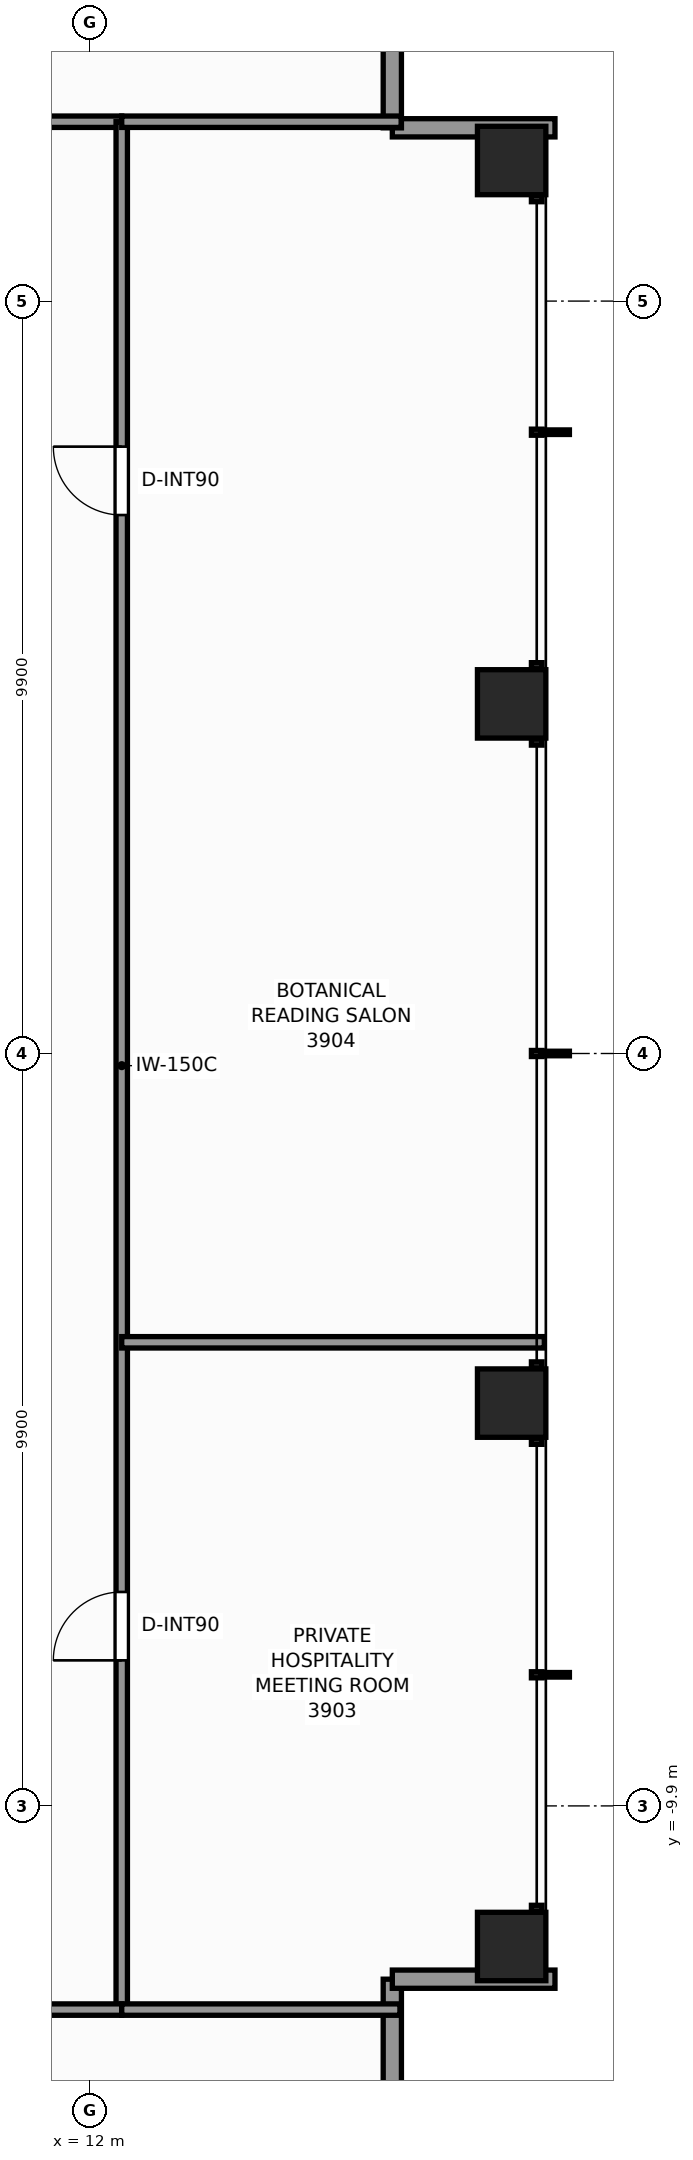
"""IFC4 building model, lengths in metres.
Left out: names, types, materials, properties, quantities, classifications, styles, units other than length and angle.
Written with IfcOpenShell. Run it as: python <this file> out.ifc"""

import sys

from ifc_helpers import new_model, si_unit, direction, frame, frame_2d, origin, origin_2d, place, context, subcontext, project, spatial, rectangle, extrude, element, fill, save


model = new_model("IFC4")
c1 = context("Model", 3, precision=1e-05, world=origin(), true_north=direction((0.0, 1.0)))
c2 = subcontext(c1, "Body", "Model", "MODEL_VIEW")
j1 = project(units=[si_unit("LENGTHUNIT", "METRE"), si_unit("PLANEANGLEUNIT", "RADIAN")], contexts=[c1])
p1 = place(None, origin())
s1 = spatial("IfcSite", under=j1, at=p1, CompositionType="ELEMENT")
p2 = place(p1, origin())
s2 = spatial("IfcBuilding", under=s1, at=p2, CompositionType="ELEMENT")
p3 = place(p2, frame((0.0, 0.0, 134.9)))
s3 = spatial("IfcBuildingStorey", under=s2, at=p3, CompositionType="ELEMENT", Elevation=134.9)
for number, where, z_axis, x_axis in (
    (1, (17.55, -11.75, 0.0), (0.0, 0.0, 1.0), (1.0, 0.0, 0.0)),
    (2, (17.55, -4.6, 0.0), (0.0, 0.0, 1.0), (1.0, 0.0, 0.0)),
    (3, (17.55, 4.6, 0.0), (0.0, 0.0, 1.0), (1.0, 0.0, 0.0)),
    (4, (17.55, 11.75, 0.0), (0.0, 0.0, 1.0), (1.0, 0.0, 0.0)),
):
    element("IfcColumn", number, at=place(p3, frame(where, z_axis=z_axis, x_axis=x_axis)), inside=s3, PredefinedType="COLUMN", context=c2, shape_type="SweptSolid", body=[
        extrude(rectangle(XDim=0.9, YDim=0.9, at=origin_2d()), origin(), (0.0, 0.0, 1.0), 3.3),
    ])
for number, where, z_axis, x_axis in (
    (5, (15.98, -12.18, 0.0), (0.0, 0.0, 1.0), (0.0, -1.0, 0.0)),
    (6, (18.12, -12.18, 0.0), (0.0, 0.0, 1.0), (-1.0, 0.0, 0.0)),
    (7, (15.98, 12.18, 0.0), (0.0, 0.0, 1.0), (1.0, 0.0, 0.0)),
    (8, (15.98, 14.32, 0.0), (0.0, 0.0, 1.0), (0.0, -1.0, 0.0)),
):
    element("IfcWall", number, at=place(p3, frame(where, z_axis=z_axis, x_axis=x_axis)), inside=s3, PredefinedType="STANDARD", context=c2, shape_type="SweptSolid", body=[
        extrude(rectangle(XDim=2.14, YDim=0.24, at=frame_2d((1.07, 0.0))), origin(), (0.0, 0.0, 1.0), 2.479),
    ])
p4 = place(p3, frame((-12.26, 12.26, 0.0), z_axis=(0.0, 0.0, 1.0), x_axis=(1.0, 0.0, 0.0)))
e9 = element("IfcWall", 9, at=p4, inside=s3, PredefinedType="PARTITIONING", context=c2, shape_type="SweptSolid", body=[
    extrude(rectangle(XDim=24.68, YDim=0.15, at=frame_2d((12.34, 0.0))), origin(), (0.0, 0.0, 1.0), 2.312),
])
p5 = place(p4, frame((4.275, 0.0, 0.0)))
e10 = element("IfcOpeningElement", 10, at=p5, cuts=e9, PredefinedType="OPENING", context=c2, shape_type="SweptSolid", body=[
    extrude(rectangle(XDim=0.9, YDim=2.06, at=frame_2d((0.45, 1.03))), frame((0.0, 0.085, 0.0), z_axis=(0.0, -1.0, 0.0), x_axis=(1.0, 0.0, 0.0)), (0.0, 0.0, 1.0), 0.17),
])
p6 = place(p4, frame((19.345, 0.0, 0.0)))
e11 = element("IfcOpeningElement", 11, at=p6, cuts=e9, PredefinedType="OPENING", context=c2, shape_type="SweptSolid", body=[
    extrude(rectangle(XDim=0.9, YDim=2.06, at=frame_2d((0.45, 1.03))), frame((0.0, 0.085, 0.0), z_axis=(0.0, -1.0, 0.0), x_axis=(1.0, 0.0, 0.0)), (0.0, 0.0, 1.0), 0.17),
])
p7 = place(p3, frame((12.42, -12.58, 0.0), z_axis=(0.0, 0.0, 1.0), x_axis=(0.0, 1.0, 0.0)))
e12 = element("IfcWall", 12, at=p7, inside=s3, PredefinedType="PARTITIONING", context=c2, shape_type="SweptSolid", body=[
    extrude(rectangle(XDim=24.84, YDim=0.15, at=frame_2d((12.42, 0.0))), origin(), (0.0, 0.0, 1.0), 2.312),
])
p8 = place(p7, frame((4.595, 0.0, 0.0)))
e13 = element("IfcOpeningElement", 13, at=p8, cuts=e12, PredefinedType="OPENING", context=c2, shape_type="SweptSolid", body=[
    extrude(rectangle(XDim=0.9, YDim=2.06, at=frame_2d((0.45, 1.03))), frame((0.0, 0.085, 0.0), z_axis=(0.0, -1.0, 0.0), x_axis=(1.0, 0.0, 0.0)), (0.0, 0.0, 1.0), 0.17),
])
p9 = place(p7, frame((19.665, 0.0, 0.0)))
e14 = element("IfcOpeningElement", 14, at=p9, cuts=e12, PredefinedType="OPENING", context=c2, shape_type="SweptSolid", body=[
    extrude(rectangle(XDim=0.9, YDim=2.06, at=frame_2d((0.45, 1.03))), frame((0.0, 0.085, 0.0), z_axis=(0.0, -1.0, 0.0), x_axis=(1.0, 0.0, 0.0)), (0.0, 0.0, 1.0), 0.17),
])
p10 = place(p3, frame((-3.65, -12.58, 0.0), z_axis=(0.0, 0.0, 1.0), x_axis=(1.0, 0.0, 0.0)))
e15 = element("IfcWall", 15, at=p10, inside=s3, PredefinedType="PARTITIONING", context=c2, shape_type="SweptSolid", body=[
    extrude(rectangle(XDim=16.07, YDim=0.15, at=frame_2d((8.035, 0.0))), origin(), (0.0, 0.0, 1.0), 2.312),
])
p11 = place(p10, frame((10.735, 0.0, 0.0)))
e16 = element("IfcOpeningElement", 16, at=p11, cuts=e15, PredefinedType="OPENING", context=c2, shape_type="SweptSolid", body=[
    extrude(rectangle(XDim=0.9, YDim=2.06, at=frame_2d((0.45, 1.03))), frame((0.0, 0.085, 0.0), z_axis=(0.0, -1.0, 0.0), x_axis=(1.0, 0.0, 0.0)), (0.0, 0.0, 1.0), 0.17),
])
p12 = place(p3, frame((12.42, -12.58, 0.0), z_axis=(0.0, 0.0, 1.0), x_axis=(1.0, 0.0, 0.0)))
e17 = element("IfcWall", 17, at=p12, inside=s3, PredefinedType="PARTITIONING", context=c2, shape_type="SweptSolid", body=[
    extrude(rectangle(XDim=3.66, YDim=0.15, at=frame_2d((1.83, 0.0))), origin(), (0.0, 0.0, 1.0), 3.1),
])
p13 = place(p3, frame((12.42, 12.26, 0.0), z_axis=(0.0, 0.0, 1.0), x_axis=(1.0, 0.0, 0.0)))
e18 = element("IfcWall", 18, at=p13, inside=s3, PredefinedType="PARTITIONING", context=c2, shape_type="SweptSolid", body=[
    extrude(rectangle(XDim=3.676, YDim=0.15, at=frame_2d((1.838, 0.0))), origin(), (0.0, 0.0, 1.0), 3.1),
])
p14 = place(p3, frame((12.42, -3.8, 0.0), z_axis=(0.0, 0.0, 1.0), x_axis=(1.0, 0.0, 0.0)))
e19 = element("IfcWall", 19, at=p14, inside=s3, PredefinedType="PARTITIONING", context=c2, shape_type="SweptSolid", body=[
    extrude(rectangle(XDim=5.56, YDim=0.15, at=frame_2d((2.78, 0.0))), origin(), (0.0, 0.0, 1.0), 2.469),
])
p15 = place(p8, origin())
e20 = element("IfcDoor", 20, at=p15, inside=s3, OperationType="SINGLE_SWING_LEFT", PredefinedType="DOOR", context=c2, shape_type="SweptSolid", body=[
    extrude(rectangle(XDim=0.9, YDim=2.06, at=frame_2d((0.45, 1.03))), frame((0.0, 0.025, 0.0), z_axis=(0.0, -1.0, 0.0), x_axis=(1.0, 0.0, 0.0)), (0.0, 0.0, 1.0), 0.05),
])
fill(e13, e20)
p16 = place(p9, origin())
e21 = element("IfcDoor", 21, at=p16, inside=s3, OperationType="SINGLE_SWING_RIGHT", PredefinedType="DOOR", context=c2, shape_type="SweptSolid", body=[
    extrude(rectangle(XDim=0.9, YDim=2.06, at=frame_2d((0.45, 1.03))), frame((0.0, 0.025, 0.0), z_axis=(0.0, -1.0, 0.0), x_axis=(1.0, 0.0, 0.0)), (0.0, 0.0, 1.0), 0.05),
])
fill(e14, e21)
save(model, sys.argv[1])
